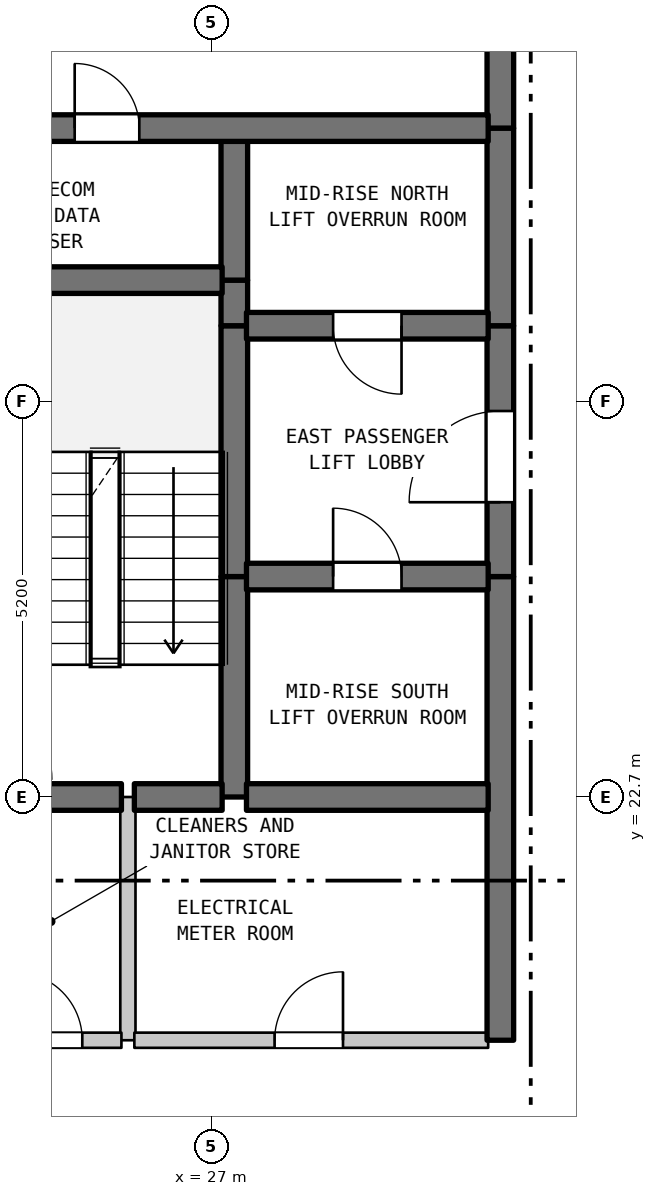
"""IFC4 building model, lengths in metres.
Left out: names, types, materials, properties, quantities, classifications, styles, units other than length and angle.
Written with IfcOpenShell. Run it as: python <this file> out.ifc"""

import sys

from ifc_helpers import new_model, si_unit, direction, frame, frame_2d, origin, place, context, subcontext, project, spatial, rectangle, extrude, element, fill, save


model = new_model("IFC4")
c1 = context("Model", 3, precision=1e-05, world=origin(), true_north=direction((0.0, 1.0)))
c2 = subcontext(c1, "Body", "Model", "MODEL_VIEW")
j1 = project(units=[si_unit("LENGTHUNIT", "METRE"), si_unit("PLANEANGLEUNIT", "RADIAN")], contexts=[c1])
p1 = place(None, origin())
s1 = spatial("IfcSite", under=j1, at=p1, CompositionType="ELEMENT")
p2 = place(p1, origin())
s2 = spatial("IfcBuilding", under=s1, at=p2, CompositionType="ELEMENT")
p3 = place(p2, frame((0.0, 0.0, 222.8)))
s3 = spatial("IfcBuildingStorey", under=s2, at=p3, CompositionType="ELEMENT", Elevation=222.8)
p4 = place(p3, frame((25.9, 19.5, 0.0), z_axis=(0.0, 0.0, 1.0), x_axis=(0.0, 1.0, 0.0)))
e1 = element("IfcWall", 1, at=p4, inside=s3, PredefinedType="STANDARD", context=c2, shape_type="SweptSolid", body=[
    extrude(rectangle(XDim=3.2, YDim=0.2, at=frame_2d((1.6, 0.0))), origin(), (0.0, 0.0, 1.0), 3.39),
])
p5 = place(p3, frame((27.3, 22.7, 0.0), z_axis=(0.0, 0.0, 1.0), x_axis=(0.0, 1.0, 0.0)))
e2 = element("IfcWall", 2, at=p5, inside=s3, PredefinedType="SHEAR", context=c2, shape_type="SweptSolid", body=[
    extrude(rectangle(XDim=2.9, YDim=0.35, at=frame_2d((1.45, 0.0))), origin(), (0.0, 0.0, 1.0), 3.39),
])
p6 = place(p3, frame((27.3, 25.6, 0.0), z_axis=(0.0, 0.0, 1.0), x_axis=(0.0, 1.0, 0.0)))
e3 = element("IfcWall", 3, at=p6, inside=s3, PredefinedType="SHEAR", context=c2, shape_type="SweptSolid", body=[
    extrude(rectangle(XDim=3.3, YDim=0.35, at=frame_2d((1.65, 0.0))), origin(), (0.0, 0.0, 1.0), 3.39),
])
p7 = place(p3, frame((27.3, 28.9, 0.0), z_axis=(0.0, 0.0, 1.0), x_axis=(0.0, 1.0, 0.0)))
e4 = element("IfcWall", 4, at=p7, inside=s3, PredefinedType="SHEAR", context=c2, shape_type="SweptSolid", body=[
    extrude(rectangle(XDim=0.6, YDim=0.35, at=frame_2d((0.3, 0.0))), origin(), (0.0, 0.0, 1.0), 3.39),
])
p8 = place(p3, frame((27.3, 29.5, 0.0), z_axis=(0.0, 0.0, 1.0), x_axis=(0.0, 1.0, 0.0)))
e5 = element("IfcWall", 5, at=p8, inside=s3, PredefinedType="SHEAR", context=c2, shape_type="SweptSolid", body=[
    extrude(rectangle(XDim=2.0, YDim=0.35, at=frame_2d((1.0, 0.0))), origin(), (0.0, 0.0, 1.0), 3.39),
])
p9 = place(p3, frame((30.8, 19.5, 0.0), z_axis=(0.0, 0.0, 1.0), x_axis=(0.0, 1.0, 0.0)))
e6 = element("IfcWall", 6, at=p9, inside=s3, PredefinedType="SHEAR", context=c2, shape_type="SweptSolid", body=[
    extrude(rectangle(XDim=6.1, YDim=0.35, at=frame_2d((3.05, 0.0))), origin(), (0.0, 0.0, 1.0), 3.39),
])
p10 = place(p3, frame((30.8, 25.6, 0.0), z_axis=(0.0, 0.0, 1.0), x_axis=(0.0, 1.0, 0.0)))
e7 = element("IfcWall", 7, at=p10, inside=s3, PredefinedType="SHEAR", context=c2, shape_type="SweptSolid", body=[
    extrude(rectangle(XDim=3.3, YDim=0.35, at=frame_2d((1.65, 0.0))), origin(), (0.0, 0.0, 1.0), 3.39),
])
p11 = place(p10, frame((0.978, 0.0, 0.0)))
e8 = element("IfcOpeningElement", 8, at=p11, cuts=e7, PredefinedType="OPENING", context=c2, shape_type="SweptSolid", body=[
    extrude(rectangle(XDim=1.2, YDim=2.2, at=frame_2d((0.6, 1.1))), frame((0.0, 0.185, 0.0), z_axis=(0.0, -1.0, 0.0), x_axis=(1.0, 0.0, 0.0)), (0.0, 0.0, 1.0), 0.37),
])
p12 = place(p3, frame((30.8, 28.9, 0.0), z_axis=(0.0, 0.0, 1.0), x_axis=(0.0, 1.0, 0.0)))
e9 = element("IfcWall", 9, at=p12, inside=s3, PredefinedType="SHEAR", context=c2, shape_type="SweptSolid", body=[
    extrude(rectangle(XDim=2.6, YDim=0.35, at=frame_2d((1.3, 0.0))), origin(), (0.0, 0.0, 1.0), 3.39),
])
p13 = place(p3, frame((30.8, 31.5, 0.0), z_axis=(0.0, 0.0, 1.0), x_axis=(0.0, 1.0, 0.0)))
e10 = element("IfcWall", 10, at=p13, inside=s3, PredefinedType="SHEAR", context=c2, shape_type="SweptSolid", body=[
    extrude(rectangle(XDim=3.5, YDim=0.35, at=frame_2d((1.75, 0.0))), origin(), (0.0, 0.0, 1.0), 3.39),
])
p14 = place(p13, frame((1.15, 0.0, 0.0)))
e11 = element("IfcOpeningElement", 11, at=p14, cuts=e10, PredefinedType="OPENING", context=c2, shape_type="SweptSolid", body=[
    extrude(rectangle(XDim=1.2, YDim=2.2, at=frame_2d((0.6, 1.1))), frame((0.0, 0.185, 0.0), z_axis=(0.0, -1.0, 0.0), x_axis=(1.0, 0.0, 0.0)), (0.0, 0.0, 1.0), 0.37),
])
p15 = place(p3, frame((23.96, 19.5, 0.0), z_axis=(0.0, 0.0, 1.0), x_axis=(1.0, 0.0, 0.0)))
e12 = element("IfcWall", 12, at=p15, inside=s3, PredefinedType="STANDARD", context=c2, shape_type="SweptSolid", body=[
    extrude(rectangle(XDim=1.855, YDim=0.2, at=frame_2d((0.927, 0.0))), origin(), (0.0, 0.0, 1.0), 3.39),
])
p16 = place(p15, frame((0.44, 0.0, 0.0)))
e13 = element("IfcOpeningElement", 13, at=p16, cuts=e12, PredefinedType="OPENING", context=c2, shape_type="SweptSolid", body=[
    extrude(rectangle(XDim=0.9, YDim=2.15, at=frame_2d((0.45, 1.075))), frame((0.0, 0.11, 0.0), z_axis=(0.0, -1.0, 0.0), x_axis=(1.0, 0.0, 0.0)), (0.0, 0.0, 1.0), 0.22),
])
p17 = place(p3, frame((25.985, 19.5, 0.0), z_axis=(0.0, 0.0, 1.0), x_axis=(1.0, 0.0, 0.0)))
e14 = element("IfcWall", 14, at=p17, inside=s3, PredefinedType="STANDARD", context=c2, shape_type="SweptSolid", body=[
    extrude(rectangle(XDim=4.655, YDim=0.2, at=frame_2d((2.327, 0.0))), origin(), (0.0, 0.0, 1.0), 3.39),
])
p18 = place(p17, frame((1.845, 0.0, 0.0)))
e15 = element("IfcOpeningElement", 15, at=p18, cuts=e14, PredefinedType="OPENING", context=c2, shape_type="SweptSolid", body=[
    extrude(rectangle(XDim=0.9, YDim=2.15, at=frame_2d((0.45, 1.075))), frame((0.0, 0.11, 0.0), z_axis=(0.0, -1.0, 0.0), x_axis=(1.0, 0.0, 0.0)), (0.0, 0.0, 1.0), 0.22),
])
p19 = place(p3, frame((23.96, 22.7, 0.0), z_axis=(0.0, 0.0, 1.0), x_axis=(1.0, 0.0, 0.0)))
e16 = element("IfcWall", 16, at=p19, inside=s3, PredefinedType="SHEAR", context=c2, shape_type="SweptSolid", body=[
    extrude(rectangle(XDim=1.855, YDim=0.35, at=frame_2d((0.927, 0.0))), origin(), (0.0, 0.0, 1.0), 3.39),
])
p20 = place(p3, frame((25.985, 22.7, 0.0), z_axis=(0.0, 0.0, 1.0), x_axis=(1.0, 0.0, 0.0)))
e17 = element("IfcWall", 17, at=p20, inside=s3, PredefinedType="SHEAR", context=c2, shape_type="SweptSolid", body=[
    extrude(rectangle(XDim=1.155, YDim=0.35, at=frame_2d((0.577, 0.0))), origin(), (0.0, 0.0, 1.0), 3.39),
])
p21 = place(p3, frame((27.46, 22.7, 0.0), z_axis=(0.0, 0.0, 1.0), x_axis=(1.0, 0.0, 0.0)))
e18 = element("IfcWall", 18, at=p21, inside=s3, PredefinedType="SHEAR", context=c2, shape_type="SweptSolid", body=[
    extrude(rectangle(XDim=3.18, YDim=0.35, at=frame_2d((1.59, 0.0))), origin(), (0.0, 0.0, 1.0), 3.39),
])
p22 = place(p3, frame((27.46, 25.6, 0.0), z_axis=(0.0, 0.0, 1.0), x_axis=(1.0, 0.0, 0.0)))
e19 = element("IfcWall", 19, at=p22, inside=s3, PredefinedType="SHEAR", context=c2, shape_type="SweptSolid", body=[
    extrude(rectangle(XDim=3.18, YDim=0.35, at=frame_2d((1.59, 0.0))), origin(), (0.0, 0.0, 1.0), 3.39),
])
p23 = place(p22, frame((1.14, 0.0, 0.0)))
e20 = element("IfcOpeningElement", 20, at=p23, cuts=e19, PredefinedType="OPENING", context=c2, shape_type="SweptSolid", body=[
    extrude(rectangle(XDim=0.9, YDim=2.15, at=frame_2d((0.45, 1.075))), frame((0.0, 0.185, 0.0), z_axis=(0.0, -1.0, 0.0), x_axis=(1.0, 0.0, 0.0)), (0.0, 0.0, 1.0), 0.37),
])
p24 = place(p3, frame((27.46, 28.9, 0.0), z_axis=(0.0, 0.0, 1.0), x_axis=(1.0, 0.0, 0.0)))
e21 = element("IfcWall", 21, at=p24, inside=s3, PredefinedType="SHEAR", context=c2, shape_type="SweptSolid", body=[
    extrude(rectangle(XDim=3.18, YDim=0.35, at=frame_2d((1.59, 0.0))), origin(), (0.0, 0.0, 1.0), 3.39),
])
p25 = place(p24, frame((1.14, 0.0, 0.0)))
e22 = element("IfcOpeningElement", 22, at=p25, cuts=e21, PredefinedType="OPENING", context=c2, shape_type="SweptSolid", body=[
    extrude(rectangle(XDim=0.9, YDim=2.15, at=frame_2d((0.45, 1.075))), frame((0.0, 0.185, 0.0), z_axis=(0.0, -1.0, 0.0), x_axis=(1.0, 0.0, 0.0)), (0.0, 0.0, 1.0), 0.37),
])
p26 = place(p3, frame((23.96, 29.5, 0.0), z_axis=(0.0, 0.0, 1.0), x_axis=(1.0, 0.0, 0.0)))
e23 = element("IfcWall", 23, at=p26, inside=s3, PredefinedType="SHEAR", context=c2, shape_type="SweptSolid", body=[
    extrude(rectangle(XDim=3.18, YDim=0.35, at=frame_2d((1.59, 0.0))), origin(), (0.0, 0.0, 1.0), 3.39),
])
p27 = place(p3, frame((23.96, 31.5, 0.0), z_axis=(0.0, 0.0, 1.0), x_axis=(1.0, 0.0, 0.0)))
e24 = element("IfcWall", 24, at=p27, inside=s3, PredefinedType="SHEAR", context=c2, shape_type="SweptSolid", body=[
    extrude(rectangle(XDim=6.68, YDim=0.35, at=frame_2d((3.34, 0.0))), origin(), (0.0, 0.0, 1.0), 3.39),
])
p28 = place(p27, frame((1.24, 0.0, 0.0)))
e25 = element("IfcOpeningElement", 25, at=p28, cuts=e24, PredefinedType="OPENING", context=c2, shape_type="SweptSolid", body=[
    extrude(rectangle(XDim=0.85, YDim=2.1, at=frame_2d((0.425, 1.05))), frame((0.0, 0.185, 0.0), z_axis=(0.0, -1.0, 0.0), x_axis=(1.0, 0.0, 0.0)), (0.0, 0.0, 1.0), 0.37),
])
p29 = place(p11, origin())
e26 = element("IfcDoor", 26, at=p29, inside=s3, OperationType="SINGLE_SWING_LEFT", PredefinedType="DOOR", context=c2, shape_type="SweptSolid", body=[
    extrude(rectangle(XDim=1.2, YDim=2.2, at=frame_2d((0.6, 1.1))), frame((0.0, 0.025, 0.0), z_axis=(0.0, -1.0, 0.0), x_axis=(1.0, 0.0, 0.0)), (0.0, 0.0, 1.0), 0.05),
])
fill(e8, e26)
p30 = place(p16, origin())
e27 = element("IfcDoor", 27, at=p30, inside=s3, OperationType="SINGLE_SWING_LEFT", PredefinedType="DOOR", context=c2, shape_type="SweptSolid", body=[
    extrude(rectangle(XDim=0.9, YDim=2.15, at=frame_2d((0.45, 1.075))), frame((0.0, 0.025, 0.0), z_axis=(0.0, -1.0, 0.0), x_axis=(1.0, 0.0, 0.0)), (0.0, 0.0, 1.0), 0.05),
])
fill(e13, e27)
p31 = place(p18, origin())
e28 = element("IfcDoor", 28, at=p31, inside=s3, OperationType="SINGLE_SWING_RIGHT", PredefinedType="DOOR", context=c2, shape_type="SweptSolid", body=[
    extrude(rectangle(XDim=0.9, YDim=2.15, at=frame_2d((0.45, 1.075))), frame((0.0, 0.025, 0.0), z_axis=(0.0, -1.0, 0.0), x_axis=(1.0, 0.0, 0.0)), (0.0, 0.0, 1.0), 0.05),
])
fill(e15, e28)
p32 = place(p23, origin())
e29 = element("IfcDoor", 29, at=p32, inside=s3, OperationType="SINGLE_SWING_LEFT", PredefinedType="DOOR", context=c2, shape_type="SweptSolid", body=[
    extrude(rectangle(XDim=0.9, YDim=2.15, at=frame_2d((0.45, 1.075))), frame((0.0, 0.025, 0.0), z_axis=(0.0, -1.0, 0.0), x_axis=(1.0, 0.0, 0.0)), (0.0, 0.0, 1.0), 0.05),
])
fill(e20, e29)
p33 = place(p25, frame((0.9, 0.0, 0.0), z_axis=(0.0, 0.0, 1.0), x_axis=(-1.0, 0.0, 0.0)))
e30 = element("IfcDoor", 30, at=p33, inside=s3, OperationType="SINGLE_SWING_RIGHT", PredefinedType="DOOR", context=c2, shape_type="SweptSolid", body=[
    extrude(rectangle(XDim=0.9, YDim=2.15, at=frame_2d((0.45, 1.075))), frame((0.0, 0.025, 0.0), z_axis=(0.0, -1.0, 0.0), x_axis=(1.0, 0.0, 0.0)), (0.0, 0.0, 1.0), 0.05),
])
fill(e22, e30)
p34 = place(p28, origin())
e31 = element("IfcDoor", 31, at=p34, inside=s3, OperationType="SINGLE_SWING_LEFT", PredefinedType="DOOR", context=c2, shape_type="SweptSolid", body=[
    extrude(rectangle(XDim=0.85, YDim=2.1, at=frame_2d((0.425, 1.05))), frame((0.0, 0.025, 0.0), z_axis=(0.0, -1.0, 0.0), x_axis=(1.0, 0.0, 0.0)), (0.0, 0.0, 1.0), 0.05),
])
fill(e25, e31)
save(model, sys.argv[1])
